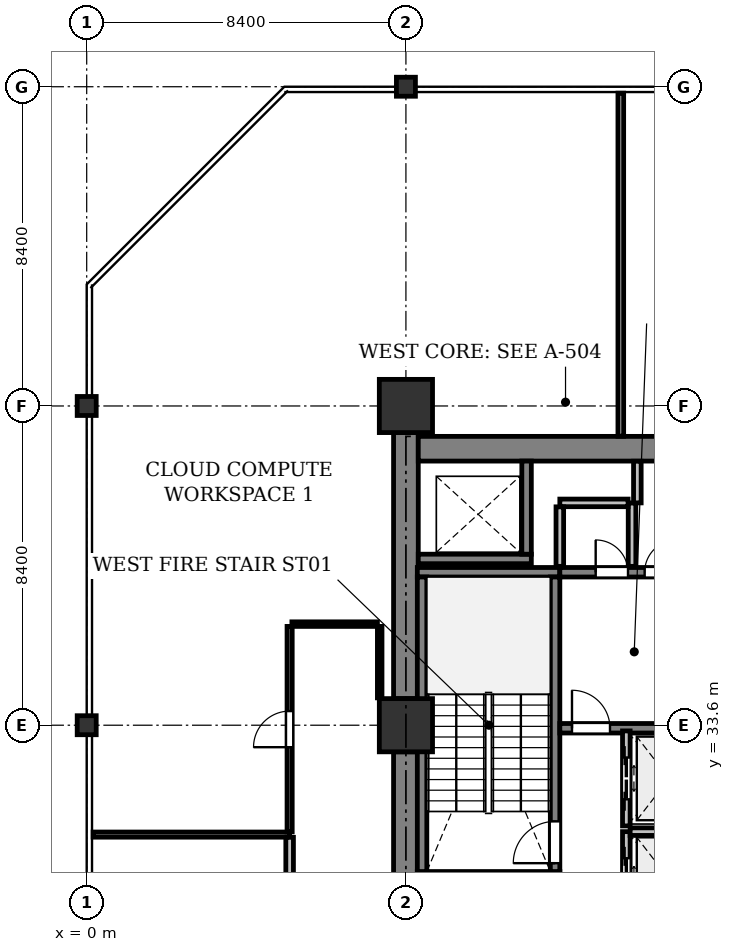
"""IFC4 building model, lengths in metres.
Left out: names, types, materials, properties, quantities, classifications, styles, units other than length and angle.
Written with IfcOpenShell. Run it as: python <this file> out.ifc"""

import sys

from ifc_helpers import new_model, si_unit, direction, frame, frame_2d, origin, origin_2d, place, context, subcontext, project, spatial, rectangle, i_section, extrude, element, fill, save


model = new_model("IFC4")
c1 = context("Model", 3, precision=1e-05, world=origin(), true_north=direction((0.0, 1.0)))
c2 = subcontext(c1, "Body", "Model", "MODEL_VIEW")
j1 = project(units=[si_unit("LENGTHUNIT", "METRE"), si_unit("PLANEANGLEUNIT", "RADIAN")], contexts=[c1])
p1 = place(None, origin())
s1 = spatial("IfcSite", under=j1, at=p1, CompositionType="ELEMENT")
p2 = place(p1, origin())
s2 = spatial("IfcBuilding", under=s1, at=p2, CompositionType="ELEMENT")
p3 = place(p2, frame((0.0, 0.0, 50.0)))
s3 = spatial("IfcBuildingStorey", under=s2, at=p3, CompositionType="ELEMENT", Elevation=50.0)
for number, where, z_axis, x_axis in (
    (1, (0.0, 33.6, 0.0), (0.0, 0.0, 1.0), (1.0, 0.0, 0.0)),
    (2, (0.0, 42.0, 0.0), (0.0, 0.0, 1.0), (1.0, 0.0, 0.0)),
):
    element("IfcColumn", number, at=place(p3, frame(where, z_axis=z_axis, x_axis=x_axis)), inside=s3, PredefinedType="COLUMN", context=c2, shape_type="SweptSolid", body=[
        extrude(i_section(OverallWidth=0.5, OverallDepth=0.5, WebThickness=0.028, FlangeThickness=0.04, at=origin_2d()), origin(), (0.0, 0.0, 1.0), 4.2),
    ])
for number, where, z_axis, x_axis in (
    (3, (8.4, 33.6, 0.0), (0.0, 0.0, 1.0), (1.0, 0.0, 0.0)),
    (4, (8.4, 42.0, 0.0), (0.0, 0.0, 1.0), (1.0, 0.0, 0.0)),
):
    element("IfcColumn", number, at=place(p3, frame(where, z_axis=z_axis, x_axis=x_axis)), inside=s3, PredefinedType="COLUMN", context=c2, shape_type="SweptSolid", body=[
        extrude(rectangle(XDim=1.4, YDim=1.4, at=origin_2d()), origin(), (0.0, 0.0, 1.0), 4.2),
    ])
p4 = place(p3, frame((8.4, 50.4, 0.0), z_axis=(0.0, 0.0, 1.0), x_axis=(1.0, 0.0, 0.0)))
e5 = element("IfcColumn", 5, at=p4, inside=s3, PredefinedType="COLUMN", context=c2, shape_type="SweptSolid", body=[
    extrude(i_section(OverallWidth=0.5, OverallDepth=0.5, WebThickness=0.028, FlangeThickness=0.04, at=origin_2d()), origin(), (0.0, 0.0, 1.0), 4.2),
])
for number, where, z_axis, x_axis in (
    (6, (8.4, 25.9, 0.0), (0.0, 0.0, 1.0), (0.0, 1.0, 0.0)),
    (7, (8.4, 34.3, 0.0), (0.0, 0.0, 1.0), (0.0, 1.0, 0.0)),
):
    element("IfcWall", number, at=place(p3, frame(where, z_axis=z_axis, x_axis=x_axis)), inside=s3, PredefinedType="SHEAR", context=c2, shape_type="SweptSolid", body=[
        extrude(rectangle(XDim=7.0, YDim=0.65, at=frame_2d((3.5, 0.0))), origin(), (0.0, 0.0, 1.0), 3.925),
    ])
p5 = place(p3, frame((8.725, 40.875, 0.0), z_axis=(0.0, 0.0, 1.0), x_axis=(1.0, 0.0, 0.0)))
e8 = element("IfcWall", 8, at=p5, inside=s3, PredefinedType="SHEAR", context=c2, shape_type="SweptSolid", body=[
    extrude(rectangle(XDim=7.75, YDim=0.65, at=frame_2d((3.875, 0.0))), origin(), (0.0, 0.0, 1.0), 3.925),
])
for number, where, z_axis, x_axis in (
    (9, (12.45, 29.625, 0.0), (0.0, 0.0, 1.0), (-1.0, 0.0, 0.0)),
    (10, (12.45, 37.625, 0.0), (0.0, 0.0, 1.0), (-1.0, 0.0, 0.0)),
):
    element("IfcWall", number, at=place(p3, frame(where, z_axis=z_axis, x_axis=x_axis)), inside=s3, PredefinedType="SHEAR", context=c2, shape_type="SweptSolid", body=[
        extrude(rectangle(XDim=3.75, YDim=0.25, at=frame_2d((1.875, 0.0))), origin(), (0.0, 0.0, 1.0), 3.925),
    ])
p6 = place(p3, frame((12.325, 29.75, 0.0), z_axis=(0.0, 0.0, 1.0), x_axis=(0.0, 1.0, 0.0)))
e11 = element("IfcWall", 11, at=p6, inside=s3, PredefinedType="SHEAR", context=c2, shape_type="SweptSolid", body=[
    extrude(rectangle(XDim=7.75, YDim=0.25, at=frame_2d((3.875, 0.0))), origin(), (0.0, 0.0, 1.0), 3.925),
])
p7 = place(p6, frame((0.22, 0.0, 0.0)))
e12 = element("IfcOpeningElement", 12, at=p7, cuts=e11, PredefinedType="OPENING", context=c2, shape_type="SweptSolid", body=[
    extrude(rectangle(XDim=1.1, YDim=2.15, at=frame_2d((0.55, 1.075))), frame((0.0, 0.135, 0.0), z_axis=(0.0, -1.0, 0.0), x_axis=(1.0, 0.0, 0.0)), (0.0, 0.0, 1.0), 0.27),
])
p8 = place(p3, frame((8.825, 29.75, 0.0), z_axis=(0.0, 0.0, 1.0), x_axis=(0.0, 1.0, 0.0)))
e13 = element("IfcWall", 13, at=p8, inside=s3, PredefinedType="SHEAR", context=c2, shape_type="SweptSolid", body=[
    extrude(rectangle(XDim=7.75, YDim=0.25, at=frame_2d((3.875, 0.0))), origin(), (0.0, 0.0, 1.0), 3.925),
])
p9 = place(p3, frame((8.725, 37.975, 0.0), z_axis=(0.0, 0.0, 1.0), x_axis=(1.0, 0.0, 0.0)))
e14 = element("IfcWall", 14, at=p9, inside=s3, PredefinedType="SHEAR", context=c2, shape_type="SweptSolid", body=[
    extrude(rectangle(XDim=2.975, YDim=0.25, at=frame_2d((1.487, 0.0))), origin(), (0.0, 0.0, 1.0), 3.925),
])
p10 = place(p3, frame((11.575, 38.1, 0.0), z_axis=(0.0, 0.0, 1.0), x_axis=(0.0, 1.0, 0.0)))
e15 = element("IfcWall", 15, at=p10, inside=s3, PredefinedType="SHEAR", context=c2, shape_type="SweptSolid", body=[
    extrude(rectangle(XDim=2.45, YDim=0.25, at=frame_2d((1.225, 0.0))), origin(), (0.0, 0.0, 1.0), 3.925),
])
p11 = place(p3, frame((12.45, 33.52, 0.0), z_axis=(0.0, 0.0, 1.0), x_axis=(1.0, 0.0, 0.0)))
e16 = element("IfcWall", 16, at=p11, inside=s3, PredefinedType="SHEAR", context=c2, shape_type="SweptSolid", body=[
    extrude(rectangle(XDim=3.65, YDim=0.25, at=frame_2d((1.825, 0.0))), origin(), (0.0, 0.0, 1.0), 3.925),
])
p12 = place(p11, frame((0.32, 0.0, 0.0)))
e17 = element("IfcOpeningElement", 17, at=p12, cuts=e16, PredefinedType="OPENING", context=c2, shape_type="SweptSolid", body=[
    extrude(rectangle(XDim=1.0, YDim=2.15, at=frame_2d((0.5, 1.075))), frame((0.0, 0.135, 0.0), z_axis=(0.0, -1.0, 0.0), x_axis=(1.0, 0.0, 0.0)), (0.0, 0.0, 1.0), 0.27),
])
p13 = place(p3, frame((12.45, 37.625, 0.0), z_axis=(0.0, 0.0, 1.0), x_axis=(1.0, 0.0, 0.0)))
e18 = element("IfcWall", 18, at=p13, inside=s3, PredefinedType="SHEAR", context=c2, shape_type="SweptSolid", body=[
    extrude(rectangle(XDim=4.025, YDim=0.25, at=frame_2d((2.013, 0.0))), origin(), (0.0, 0.0, 1.0), 3.925),
])
p14 = place(p13, frame((0.944, 0.0, 0.0)))
e19 = element("IfcOpeningElement", 19, at=p14, cuts=e18, PredefinedType="OPENING", context=c2, shape_type="SweptSolid", body=[
    extrude(rectangle(XDim=0.85, YDim=2.15, at=frame_2d((0.425, 1.075))), frame((0.0, 0.135, 0.0), z_axis=(0.0, -1.0, 0.0), x_axis=(1.0, 0.0, 0.0)), (0.0, 0.0, 1.0), 0.27),
])
p15 = place(p13, frame((2.231, 0.0, 0.0)))
e20 = element("IfcOpeningElement", 20, at=p15, cuts=e18, PredefinedType="OPENING", context=c2, shape_type="SweptSolid", body=[
    extrude(rectangle(XDim=0.85, YDim=2.15, at=frame_2d((0.425, 1.075))), frame((0.0, 0.135, 0.0), z_axis=(0.0, -1.0, 0.0), x_axis=(1.0, 0.0, 0.0)), (0.0, 0.0, 1.0), 0.27),
])
p16 = place(p3, frame((14.2, 28.3, 0.0), z_axis=(0.0, 0.0, 1.0), x_axis=(0.0, 1.0, 0.0)))
e21 = element("IfcWall", 21, at=p16, inside=s3, PredefinedType="PARTITIONING", context=c2, shape_type="SweptSolid", body=[
    extrude(rectangle(XDim=2.5, YDim=0.2, at=frame_2d((1.25, 0.0))), origin(), (0.0, 0.0, 1.0), 3.925),
])
p17 = place(p16, frame((0.7, 0.0, 0.0)))
e22 = element("IfcOpeningElement", 22, at=p17, cuts=e21, PredefinedType="OPENING", context=c2, shape_type="SweptSolid", body=[
    extrude(rectangle(XDim=1.1, YDim=2.2, at=frame_2d((0.55, 1.1))), frame((0.0, 0.11, 0.0), z_axis=(0.0, -1.0, 0.0), x_axis=(1.0, 0.0, 0.0)), (0.0, 0.0, 1.0), 0.22),
])
p18 = place(p3, frame((14.3, 30.8, 0.0), z_axis=(0.0, 0.0, 1.0), x_axis=(1.0, 0.0, 0.0)))
e23 = element("IfcWall", 23, at=p18, inside=s3, PredefinedType="PARTITIONING", context=c2, shape_type="SweptSolid", body=[
    extrude(rectangle(XDim=2.05, YDim=0.2, at=frame_2d((1.025, 0.0))), origin(), (0.0, 0.0, 1.0), 3.925),
])
p19 = place(p3, frame((14.2, 30.95, 0.0), z_axis=(0.0, 0.0, 1.0), x_axis=(0.0, 1.0, 0.0)))
e24 = element("IfcWall", 24, at=p19, inside=s3, PredefinedType="PARTITIONING", context=c2, shape_type="SweptSolid", body=[
    extrude(rectangle(XDim=2.5, YDim=0.2, at=frame_2d((1.25, 0.0))), origin(), (0.0, 0.0, 1.0), 3.925),
])
p20 = place(p19, frame((0.7, 0.0, 0.0)))
e25 = element("IfcOpeningElement", 25, at=p20, cuts=e24, PredefinedType="OPENING", context=c2, shape_type="SweptSolid", body=[
    extrude(rectangle(XDim=1.1, YDim=2.2, at=frame_2d((0.55, 1.1))), frame((0.0, 0.11, 0.0), z_axis=(0.0, -1.0, 0.0), x_axis=(1.0, 0.0, 0.0)), (0.0, 0.0, 1.0), 0.22),
])
p21 = place(p3, frame((14.35, 37.78, 0.0), z_axis=(0.0, 0.0, 1.0), x_axis=(0.0, 1.0, 0.0)))
e26 = element("IfcWall", 26, at=p21, inside=s3, PredefinedType="PARTITIONING", context=c2, shape_type="SweptSolid", body=[
    extrude(rectangle(XDim=1.67, YDim=0.2, at=frame_2d((0.835, 0.0))), origin(), (0.0, 0.0, 1.0), 2.825),
])
p22 = place(p3, frame((14.246, 39.45, 0.0), z_axis=(0.0, 0.0, 1.0), x_axis=(-1.0, 0.0, 0.0)))
e27 = element("IfcWall", 27, at=p22, inside=s3, PredefinedType="PARTITIONING", context=c2, shape_type="SweptSolid", body=[
    extrude(rectangle(XDim=1.796, YDim=0.2, at=frame_2d((0.898, 0.0))), origin(), (0.0, 0.0, 1.0), 2.825),
])
p23 = place(p3, frame((12.45, 39.346, 0.0), z_axis=(0.0, 0.0, 1.0), x_axis=(0.0, -1.0, 0.0)))
e28 = element("IfcWall", 28, at=p23, inside=s3, PredefinedType="PARTITIONING", context=c2, shape_type="SweptSolid", body=[
    extrude(rectangle(XDim=1.566, YDim=0.2, at=frame_2d((0.783, 0.0))), origin(), (0.0, 0.0, 1.0), 2.825),
])
p24 = place(p3, frame((14.49, 40.546, 0.0), z_axis=(0.0, 0.0, 1.0), x_axis=(0.0, -1.0, 0.0)))
e29 = element("IfcWall", 29, at=p24, inside=s3, PredefinedType="PARTITIONING", context=c2, shape_type="SweptSolid", body=[
    extrude(rectangle(XDim=1.096, YDim=0.2, at=frame_2d((0.548, 0.0))), origin(), (0.0, 0.0, 1.0), 2.825),
])
p25 = place(p3, frame((14.055, 50.231, 0.0), z_axis=(0.0, 0.0, 1.0), x_axis=(0.0, -1.0, 0.0)))
e30 = element("IfcWall", 30, at=p25, inside=s3, PredefinedType="PARTITIONING", context=c2, shape_type="SweptSolid", body=[
    extrude(rectangle(XDim=9.027, YDim=0.15, at=frame_2d((4.513, 0.0))), origin(), (0.0, 0.0, 1.0), 3.313),
])
p26 = place(p3, frame((0.169, 30.722, 0.0), z_axis=(0.0, 0.0, 1.0), x_axis=(1.0, 0.0, 0.0)))
e31 = element("IfcWall", 31, at=p26, inside=s3, PredefinedType="PARTITIONING", context=c2, shape_type="SweptSolid", body=[
    extrude(rectangle(XDim=5.171, YDim=0.135, at=frame_2d((2.585, 0.0))), origin(), (0.0, 0.0, 1.0), 3.566),
])
p27 = place(p3, frame((5.34, 30.793, 0.0), z_axis=(0.0, 0.0, 1.0), x_axis=(0.0, 1.0, 0.0)))
e32 = element("IfcWall", 32, at=p27, inside=s3, PredefinedType="PARTITIONING", context=c2, shape_type="SweptSolid", body=[
    extrude(rectangle(XDim=5.406, YDim=0.135, at=frame_2d((2.703, 0.0))), origin(), (0.0, 0.0, 1.0), 3.313),
])
p28 = place(p27, frame((2.228, 0.0, 0.0)))
e33 = element("IfcOpeningElement", 33, at=p28, cuts=e32, PredefinedType="OPENING", context=c2, shape_type="SweptSolid", body=[
    extrude(rectangle(XDim=0.95, YDim=2.15, at=frame_2d((0.475, 1.075))), frame((0.0, 0.077, 0.0), z_axis=(0.0, -1.0, 0.0), x_axis=(1.0, 0.0, 0.0)), (0.0, 0.0, 1.0), 0.155),
])
p29 = place(p3, frame((5.4, 36.26, 0.0), z_axis=(0.0, 0.0, 1.0), x_axis=(1.0, 0.0, 0.0)))
e34 = element("IfcWall", 34, at=p29, inside=s3, PredefinedType="PARTITIONING", context=c2, shape_type="SweptSolid", body=[
    extrude(rectangle(XDim=2.25, YDim=0.12, at=frame_2d((1.125, 0.0))), origin(), (0.0, 0.0, 1.0), 3.925),
])
p30 = place(p3, frame((7.71, 36.2, 0.0), z_axis=(0.0, 0.0, 1.0), x_axis=(0.0, -1.0, 0.0)))
e35 = element("IfcWall", 35, at=p30, inside=s3, PredefinedType="PARTITIONING", context=c2, shape_type="SweptSolid", body=[
    extrude(rectangle(XDim=1.88, YDim=0.12, at=frame_2d((0.94, 0.0))), origin(), (0.0, 0.0, 1.0), 3.925),
])
p31 = place(p3, frame((5.34, 17.6, 0.0), z_axis=(0.0, 0.0, 1.0), x_axis=(0.0, 1.0, 0.0)))
e36 = element("IfcWall", 36, at=p31, inside=s3, PredefinedType="PARTITIONING", context=c2, shape_type="SweptSolid", body=[
    extrude(rectangle(XDim=13.05, YDim=0.2, at=frame_2d((6.525, 0.0))), origin(), (0.0, 0.0, 1.0), 3.313),
])
p32 = place(p31, frame((6.025, 0.0, 0.0)))
e37 = element("IfcOpeningElement", 37, at=p32, cuts=e36, PredefinedType="OPENING", context=c2, shape_type="SweptSolid", body=[
    extrude(rectangle(XDim=1.0, YDim=2.15, at=frame_2d((0.5, 1.075))), frame((0.0, 0.11, 0.0), z_axis=(0.0, -1.0, 0.0), x_axis=(1.0, 0.0, 0.0)), (0.0, 0.0, 1.0), 0.22),
])
p33 = place(p7, origin())
e38 = element("IfcDoor", 38, at=p33, inside=s3, OperationType="SINGLE_SWING_LEFT", PredefinedType="DOOR", context=c2, shape_type="SweptSolid", body=[
    extrude(rectangle(XDim=1.1, YDim=2.15, at=frame_2d((0.55, 1.075))), frame((0.0, 0.025, 0.0), z_axis=(0.0, -1.0, 0.0), x_axis=(1.0, 0.0, 0.0)), (0.0, 0.0, 1.0), 0.05),
])
fill(e12, e38)
p34 = place(p12, origin())
e39 = element("IfcDoor", 39, at=p34, inside=s3, OperationType="SINGLE_SWING_LEFT", PredefinedType="DOOR", context=c2, shape_type="SweptSolid", body=[
    extrude(rectangle(XDim=1.0, YDim=2.15, at=frame_2d((0.5, 1.075))), frame((0.0, 0.025, 0.0), z_axis=(0.0, -1.0, 0.0), x_axis=(1.0, 0.0, 0.0)), (0.0, 0.0, 1.0), 0.05),
])
fill(e17, e39)
p35 = place(p17, origin())
e40 = element("IfcDoor", 40, at=p35, inside=s3, OperationType="DOUBLE_DOOR_SLIDING", PredefinedType="DOOR", context=c2, shape_type="SweptSolid", body=[
    extrude(rectangle(XDim=1.1, YDim=2.2, at=frame_2d((0.55, 1.1))), frame((0.0, 0.025, 0.0), z_axis=(0.0, -1.0, 0.0), x_axis=(1.0, 0.0, 0.0)), (0.0, 0.0, 1.0), 0.05),
])
fill(e22, e40)
p36 = place(p20, origin())
e41 = element("IfcDoor", 41, at=p36, inside=s3, OperationType="DOUBLE_DOOR_SLIDING", PredefinedType="DOOR", context=c2, shape_type="SweptSolid", body=[
    extrude(rectangle(XDim=1.1, YDim=2.2, at=frame_2d((0.55, 1.1))), frame((0.0, 0.025, 0.0), z_axis=(0.0, -1.0, 0.0), x_axis=(1.0, 0.0, 0.0)), (0.0, 0.0, 1.0), 0.05),
])
fill(e25, e41)
p37 = place(p14, origin())
e42 = element("IfcDoor", 42, at=p37, inside=s3, OperationType="SINGLE_SWING_LEFT", PredefinedType="DOOR", context=c2, shape_type="SweptSolid", body=[
    extrude(rectangle(XDim=0.85, YDim=2.15, at=frame_2d((0.425, 1.075))), frame((0.0, 0.025, 0.0), z_axis=(0.0, -1.0, 0.0), x_axis=(1.0, 0.0, 0.0)), (0.0, 0.0, 1.0), 0.05),
])
fill(e19, e42)
p38 = place(p15, origin())
e43 = element("IfcDoor", 43, at=p38, inside=s3, OperationType="SINGLE_SWING_RIGHT", PredefinedType="DOOR", context=c2, shape_type="SweptSolid", body=[
    extrude(rectangle(XDim=0.85, YDim=2.15, at=frame_2d((0.425, 1.075))), frame((0.0, 0.025, 0.0), z_axis=(0.0, -1.0, 0.0), x_axis=(1.0, 0.0, 0.0)), (0.0, 0.0, 1.0), 0.05),
])
fill(e20, e43)
p39 = place(p28, origin())
e44 = element("IfcDoor", 44, at=p39, inside=s3, OperationType="SINGLE_SWING_LEFT", PredefinedType="DOOR", context=c2, shape_type="SweptSolid", body=[
    extrude(rectangle(XDim=0.95, YDim=2.15, at=frame_2d((0.475, 1.075))), frame((0.0, 0.025, 0.0), z_axis=(0.0, -1.0, 0.0), x_axis=(1.0, 0.0, 0.0)), (0.0, 0.0, 1.0), 0.05),
])
fill(e33, e44)
save(model, sys.argv[1])
